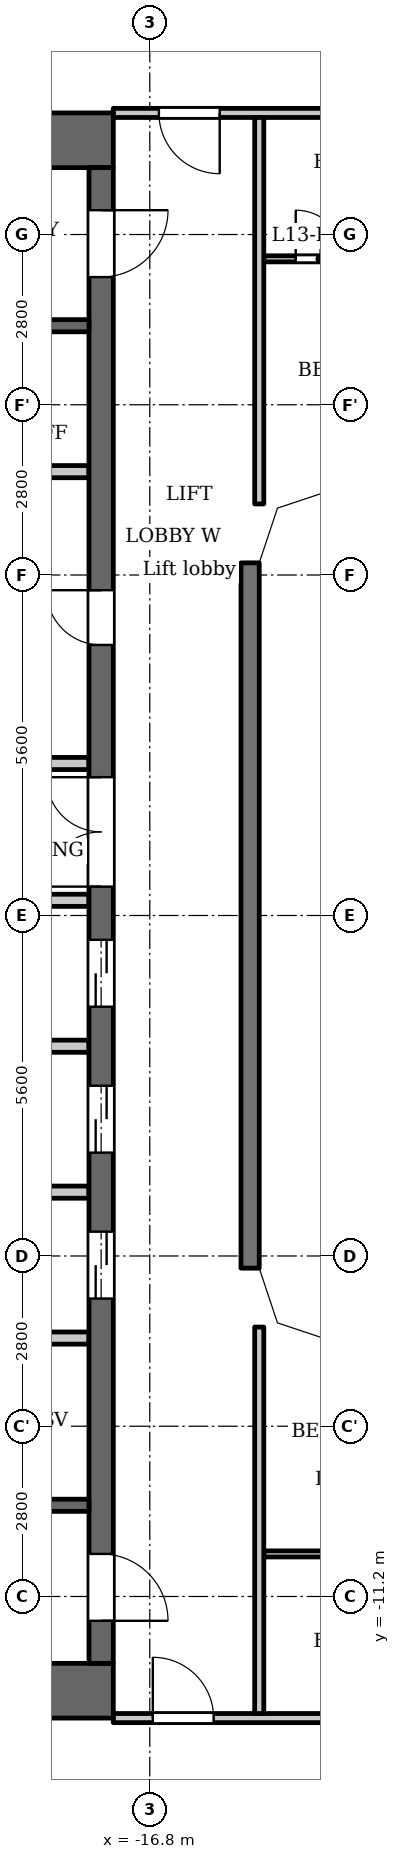
"""IFC4 building model, lengths in metres.
Left out: names, types, materials, properties, quantities, classifications, styles, units other than length and angle.
Written with IfcOpenShell. Run it as: python <this file> out.ifc"""

import sys

from ifc_helpers import new_model, si_unit, direction, frame, frame_2d, origin, place, context, subcontext, project, spatial, polyline, rectangle, outline, extrude, element, fill, save


model = new_model("IFC4")
c1 = context("Model", 3, precision=1e-05, world=origin(), true_north=direction((0.0, 1.0)))
c2 = subcontext(c1, "Body", "Model", "MODEL_VIEW")
j1 = project(units=[si_unit("LENGTHUNIT", "METRE"), si_unit("PLANEANGLEUNIT", "RADIAN")], contexts=[c1])
p1 = place(None, origin())
s1 = spatial("IfcSite", under=j1, at=p1, CompositionType="ELEMENT")
p2 = place(p1, origin())
s2 = spatial("IfcBuilding", under=s1, at=p2, CompositionType="ELEMENT")
p3 = place(p2, frame((0.0, 0.0, 55.0)))
s3 = spatial("IfcBuildingStorey", under=s2, at=p3, CompositionType="ELEMENT", Elevation=55.0)
p4 = place(p3, frame((-15.15, -5.8, 0.0), z_axis=(0.0, 0.0, 1.0), x_axis=(0.0, 1.0, 0.0)))
e1 = element("IfcWall", 1, at=p4, inside=s3, PredefinedType="SOLIDWALL", context=c2, shape_type="SweptSolid", body=[
    extrude(rectangle(XDim=11.6, YDim=0.3, at=frame_2d((5.8, 0.0))), origin(), (0.0, 0.0, 1.0), 3.2),
])
for number, where, z_axis, x_axis in (
    (2, (-17.4, 12.75, 0.0), (0.0, 0.0, 1.0), (-1.0, 0.0, 0.0)),
    (3, (-17.4, -12.75, 0.0), (0.0, 0.0, 1.0), (-1.0, 0.0, 0.0)),
):
    element("IfcWall", number, at=place(p3, frame(where, z_axis=z_axis, x_axis=x_axis)), inside=s3, PredefinedType="SHEAR", context=c2, shape_type="SweptSolid", body=[
        extrude(rectangle(XDim=10.4, YDim=0.9, at=frame_2d((5.2, 0.0))), origin(), (0.0, 0.0, 1.0), 3.2),
    ])
p5 = place(p3, frame((-17.6, -12.3, 0.0), z_axis=(0.0, 0.0, 1.0), x_axis=(0.0, 1.0, 0.0)))
e4 = element("IfcWall", 4, at=p5, inside=s3, PredefinedType="SHEAR", context=c2, shape_type="SweptSolid", body=[
    extrude(rectangle(XDim=24.6, YDim=0.4, at=frame_2d((12.3, 0.0))), origin(), (0.0, 0.0, 1.0), 3.2),
])
p6 = place(p5, frame((6.0, 0.0, 0.0)))
e5 = element("IfcOpeningElement", 5, at=p6, cuts=e4, PredefinedType="OPENING", context=c2, shape_type="SweptSolid", body=[
    extrude(rectangle(XDim=1.1, YDim=2.1, at=frame_2d((0.55, 1.05))), frame((0.0, 0.21, 0.0), z_axis=(0.0, -1.0, 0.0), x_axis=(1.0, 0.0, 0.0)), (0.0, 0.0, 1.0), 0.42),
])
p7 = place(p5, frame((8.4, 0.0, 0.0)))
e6 = element("IfcOpeningElement", 6, at=p7, cuts=e4, PredefinedType="OPENING", context=c2, shape_type="SweptSolid", body=[
    extrude(rectangle(XDim=1.1, YDim=2.1, at=frame_2d((0.55, 1.05))), frame((0.0, 0.21, 0.0), z_axis=(0.0, -1.0, 0.0), x_axis=(1.0, 0.0, 0.0)), (0.0, 0.0, 1.0), 0.42),
])
p8 = place(p5, frame((10.8, 0.0, 0.0)))
e7 = element("IfcOpeningElement", 7, at=p8, cuts=e4, PredefinedType="OPENING", context=c2, shape_type="SweptSolid", body=[
    extrude(rectangle(XDim=1.1, YDim=2.1, at=frame_2d((0.55, 1.05))), frame((0.0, 0.21, 0.0), z_axis=(0.0, -1.0, 0.0), x_axis=(1.0, 0.0, 0.0)), (0.0, 0.0, 1.0), 0.42),
])
p9 = place(p5, frame((16.75, 0.0, 0.0)))
e8 = element("IfcOpeningElement", 8, at=p9, cuts=e4, PredefinedType="OPENING", context=c2, shape_type="SweptSolid", body=[
    extrude(rectangle(XDim=0.9, YDim=2.1, at=frame_2d((0.45, 1.05))), frame((0.0, 0.21, 0.0), z_axis=(0.0, -1.0, 0.0), x_axis=(1.0, 0.0, 0.0)), (0.0, 0.0, 1.0), 0.42),
])
p10 = place(p5, frame((22.8, 0.0, 0.0)))
e9 = element("IfcOpeningElement", 9, at=p10, cuts=e4, PredefinedType="OPENING", context=c2, shape_type="SweptSolid", body=[
    extrude(rectangle(XDim=1.1, YDim=2.1, at=frame_2d((0.55, 1.05))), frame((0.0, 0.21, 0.0), z_axis=(0.0, -1.0, 0.0), x_axis=(1.0, 0.0, 0.0)), (0.0, 0.0, 1.0), 0.42),
])
p11 = place(p5, frame((0.7, 0.0, 0.0)))
e10 = element("IfcOpeningElement", 10, at=p11, cuts=e4, PredefinedType="OPENING", context=c2, shape_type="SweptSolid", body=[
    extrude(rectangle(XDim=1.1, YDim=2.1, at=frame_2d((0.55, 1.05))), frame((0.0, 0.21, 0.0), z_axis=(0.0, -1.0, 0.0), x_axis=(1.0, 0.0, 0.0)), (0.0, 0.0, 1.0), 0.42),
])
p12 = place(p5, frame((12.775, 0.0, 0.0)))
e11 = element("IfcOpeningElement", 11, at=p12, cuts=e4, PredefinedType="OPENING", context=c2, shape_type="SweptSolid", body=[
    extrude(rectangle(XDim=1.8, YDim=2.1, at=frame_2d((0.9, 1.05))), frame((0.0, 0.21, 0.0), z_axis=(0.0, -1.0, 0.0), x_axis=(1.0, 0.0, 0.0)), (0.0, 0.0, 1.0), 0.42),
])
p13 = place(p3, frame((-17.8, -9.7, 0.0), z_axis=(0.0, 0.0, 1.0), x_axis=(-1.0, 0.0, 0.0)))
e12 = element("IfcWall", 12, at=p13, inside=s3, PredefinedType="SHEAR", context=c2, shape_type="SweptSolid", body=[
    extrude(rectangle(XDim=8.3, YDim=0.2, at=frame_2d((4.15, 0.0))), origin(), (0.0, 0.0, 1.0), 3.2),
])
p14 = place(p13, frame((0.85, 0.0, 0.0)))
e13 = element("IfcOpeningElement", 13, at=p14, cuts=e12, PredefinedType="OPENING", context=c2, shape_type="SweptSolid", body=[
    extrude(rectangle(XDim=1.1, YDim=2.1, at=frame_2d((0.55, 1.05))), frame((0.0, 0.11, 0.0), z_axis=(0.0, -1.0, 0.0), x_axis=(1.0, 0.0, 0.0)), (0.0, 0.0, 1.0), 0.22),
])
p15 = place(p13, frame((3.75, 0.0, 0.0)))
e14 = element("IfcOpeningElement", 14, at=p15, cuts=e12, PredefinedType="OPENING", context=c2, shape_type="SweptSolid", body=[
    extrude(rectangle(XDim=1.1, YDim=2.1, at=frame_2d((0.55, 1.05))), frame((0.0, 0.11, 0.0), z_axis=(0.0, -1.0, 0.0), x_axis=(1.0, 0.0, 0.0)), (0.0, 0.0, 1.0), 0.22),
])
for number, where, z_axis, x_axis in (
    (15, (-17.8, -6.95, 0.0), (0.0, 0.0, 1.0), (-1.0, 0.0, 0.0)),
    (16, (-17.8, -4.55, 0.0), (0.0, 0.0, 1.0), (-1.0, 0.0, 0.0)),
    (17, (-17.8, -2.15, 0.0), (0.0, 0.0, 1.0), (-1.0, 0.0, 0.0)),
):
    element("IfcWall", number, at=place(p3, frame(where, z_axis=z_axis, x_axis=x_axis)), inside=s3, PredefinedType="PARTITIONING", context=c2, shape_type="SweptSolid", body=[
        extrude(rectangle(XDim=2.8, YDim=0.2, at=frame_2d((1.4, 0.0))), origin(), (0.0, 0.0, 1.0), 3.2),
    ])
for number, where, z_axis, x_axis in (
    (18, (-17.8, 0.25, 0.0), (0.0, 0.0, 1.0), (-1.0, 0.0, 0.0)),
    (19, (-17.8, 2.5, 0.0), (0.0, 0.0, 1.0), (-1.0, 0.0, 0.0)),
):
    element("IfcWall", number, at=place(p3, frame(where, z_axis=z_axis, x_axis=x_axis)), inside=s3, PredefinedType="PARTITIONING", context=c2, shape_type="SweptSolid", body=[
        extrude(rectangle(XDim=3.0, YDim=0.2, at=frame_2d((1.5, 0.0))), origin(), (0.0, 0.0, 1.0), 3.2),
    ])
p16 = place(p3, frame((-17.8, 7.3, 0.0), z_axis=(0.0, 0.0, 1.0), x_axis=(-1.0, 0.0, 0.0)))
e20 = element("IfcWall", 20, at=p16, inside=s3, PredefinedType="PARTITIONING", context=c2, shape_type="SweptSolid", body=[
    extrude(rectangle(XDim=2.8, YDim=0.2, at=frame_2d((1.4, 0.0))), origin(), (0.0, 0.0, 1.0), 3.2),
])
p17 = place(p3, frame((-17.8, 9.7, 0.0), z_axis=(0.0, 0.0, 1.0), x_axis=(-1.0, 0.0, 0.0)))
e21 = element("IfcWall", 21, at=p17, inside=s3, PredefinedType="SHEAR", context=c2, shape_type="SweptSolid", body=[
    extrude(rectangle(XDim=8.3, YDim=0.2, at=frame_2d((4.15, 0.0))), origin(), (0.0, 0.0, 1.0), 3.2),
])
p18 = place(p17, frame((0.85, 0.0, 0.0)))
e22 = element("IfcOpeningElement", 22, at=p18, cuts=e21, PredefinedType="OPENING", context=c2, shape_type="SweptSolid", body=[
    extrude(rectangle(XDim=1.1, YDim=2.1, at=frame_2d((0.55, 1.05))), frame((0.0, 0.11, 0.0), z_axis=(0.0, -1.0, 0.0), x_axis=(1.0, 0.0, 0.0)), (0.0, 0.0, 1.0), 0.22),
])
p19 = place(p17, frame((3.75, 0.0, 0.0)))
e23 = element("IfcOpeningElement", 23, at=p19, cuts=e21, PredefinedType="OPENING", context=c2, shape_type="SweptSolid", body=[
    extrude(rectangle(XDim=1.1, YDim=2.1, at=frame_2d((0.55, 1.05))), frame((0.0, 0.11, 0.0), z_axis=(0.0, -1.0, 0.0), x_axis=(1.0, 0.0, 0.0)), (0.0, 0.0, 1.0), 0.22),
])
p20 = place(p3, frame((-17.4, -13.2, 0.0), z_axis=(0.0, 0.0, 1.0), x_axis=(1.0, 0.0, 0.0)))
e24 = element("IfcWall", 24, at=p20, inside=s3, PredefinedType="PARTITIONING", context=c2, shape_type="SweptSolid", body=[
    extrude(rectangle(XDim=34.8, YDim=0.15, at=frame_2d((17.4, 0.0))), origin(), (0.0, 0.0, 1.0), 3.2),
])
p21 = place(p20, frame((0.65, 0.0, 0.0)))
e25 = element("IfcOpeningElement", 25, at=p21, cuts=e24, PredefinedType="OPENING", context=c2, shape_type="SweptSolid", body=[
    extrude(rectangle(XDim=1.0, YDim=2.1, at=frame_2d((0.5, 1.05))), frame((0.0, 0.085, 0.0), z_axis=(0.0, -1.0, 0.0), x_axis=(1.0, 0.0, 0.0)), (0.0, 0.0, 1.0), 0.17),
])
p22 = place(p20, frame((33.05, 0.0, 0.0)))
e26 = element("IfcOpeningElement", 26, at=p22, cuts=e24, PredefinedType="OPENING", context=c2, shape_type="SweptSolid", body=[
    extrude(rectangle(XDim=1.0, YDim=2.1, at=frame_2d((0.5, 1.05))), frame((0.0, 0.085, 0.0), z_axis=(0.0, -1.0, 0.0), x_axis=(1.0, 0.0, 0.0)), (0.0, 0.0, 1.0), 0.17),
])
p23 = place(p20, frame((10.15, 0.0, 0.0)))
e27 = element("IfcOpeningElement", 27, at=p23, cuts=e24, PredefinedType="OPENING", context=c2, shape_type="SweptSolid", body=[
    extrude(rectangle(XDim=1.0, YDim=2.1, at=frame_2d((0.5, 1.05))), frame((0.0, 0.085, 0.0), z_axis=(0.0, -1.0, 0.0), x_axis=(1.0, 0.0, 0.0)), (0.0, 0.0, 1.0), 0.17),
])
p24 = place(p20, frame((21.35, 0.0, 0.0)))
e28 = element("IfcOpeningElement", 28, at=p24, cuts=e24, PredefinedType="OPENING", context=c2, shape_type="SweptSolid", body=[
    extrude(rectangle(XDim=1.0, YDim=2.1, at=frame_2d((0.5, 1.05))), frame((0.0, 0.085, 0.0), z_axis=(0.0, -1.0, 0.0), x_axis=(1.0, 0.0, 0.0)), (0.0, 0.0, 1.0), 0.17),
])
p25 = place(p20, frame((30.75, 0.0, 0.0)))
e29 = element("IfcOpeningElement", 29, at=p25, cuts=e24, PredefinedType="OPENING", context=c2, shape_type="SweptSolid", body=[
    extrude(rectangle(XDim=1.0, YDim=2.1, at=frame_2d((0.5, 1.05))), frame((0.0, 0.085, 0.0), z_axis=(0.0, -1.0, 0.0), x_axis=(1.0, 0.0, 0.0)), (0.0, 0.0, 1.0), 0.17),
])
p26 = place(p3, frame((-14.925, -10.5, 0.0), z_axis=(0.0, 0.0, 1.0), x_axis=(1.0, 0.0, 0.0)))
e30 = element("IfcWall", 30, at=p26, inside=s3, PredefinedType="PARTITIONING", context=c2, shape_type="SweptSolid", body=[
    extrude(rectangle(XDim=29.85, YDim=0.1, at=frame_2d((14.925, 0.0))), origin(), (0.0, 0.0, 1.0), 3.2),
])
p27 = place(p26, frame((2.325, 0.0, 0.0)))
e31 = element("IfcOpeningElement", 31, at=p27, cuts=e30, PredefinedType="OPENING", context=c2, shape_type="SweptSolid", body=[
    extrude(rectangle(XDim=0.8, YDim=2.1, at=frame_2d((0.4, 1.05))), frame((0.0, 0.06, 0.0), z_axis=(0.0, -1.0, 0.0), x_axis=(1.0, 0.0, 0.0)), (0.0, 0.0, 1.0), 0.12),
])
p28 = place(p26, frame((7.775, 0.0, 0.0)))
e32 = element("IfcOpeningElement", 32, at=p28, cuts=e30, PredefinedType="OPENING", context=c2, shape_type="SweptSolid", body=[
    extrude(rectangle(XDim=0.9, YDim=2.1, at=frame_2d((0.45, 1.05))), frame((0.0, 0.06, 0.0), z_axis=(0.0, -1.0, 0.0), x_axis=(1.0, 0.0, 0.0)), (0.0, 0.0, 1.0), 0.12),
])
p29 = place(p26, frame((13.475, 0.0, 0.0)))
e33 = element("IfcOpeningElement", 33, at=p29, cuts=e30, PredefinedType="OPENING", context=c2, shape_type="SweptSolid", body=[
    extrude(rectangle(XDim=0.8, YDim=2.1, at=frame_2d((0.4, 1.05))), frame((0.0, 0.06, 0.0), z_axis=(0.0, -1.0, 0.0), x_axis=(1.0, 0.0, 0.0)), (0.0, 0.0, 1.0), 0.12),
])
p30 = place(p26, frame((18.975, 0.0, 0.0)))
e34 = element("IfcOpeningElement", 34, at=p30, cuts=e30, PredefinedType="OPENING", context=c2, shape_type="SweptSolid", body=[
    extrude(rectangle(XDim=0.9, YDim=2.1, at=frame_2d((0.45, 1.05))), frame((0.0, 0.06, 0.0), z_axis=(0.0, -1.0, 0.0), x_axis=(1.0, 0.0, 0.0)), (0.0, 0.0, 1.0), 0.12),
])
p31 = place(p26, frame((24.675, 0.0, 0.0)))
e35 = element("IfcOpeningElement", 35, at=p31, cuts=e30, PredefinedType="OPENING", context=c2, shape_type="SweptSolid", body=[
    extrude(rectangle(XDim=0.8, YDim=2.1, at=frame_2d((0.4, 1.05))), frame((0.0, 0.06, 0.0), z_axis=(0.0, -1.0, 0.0), x_axis=(1.0, 0.0, 0.0)), (0.0, 0.0, 1.0), 0.12),
])
p32 = place(p26, frame((28.375, 0.0, 0.0)))
e36 = element("IfcOpeningElement", 36, at=p32, cuts=e30, PredefinedType="OPENING", context=c2, shape_type="SweptSolid", body=[
    extrude(rectangle(XDim=0.9, YDim=2.1, at=frame_2d((0.45, 1.05))), frame((0.0, 0.06, 0.0), z_axis=(0.0, -1.0, 0.0), x_axis=(1.0, 0.0, 0.0)), (0.0, 0.0, 1.0), 0.12),
])
p33 = place(p3, frame((-14.925, 10.8, 0.0), z_axis=(0.0, 0.0, 1.0), x_axis=(1.0, 0.0, 0.0)))
e37 = element("IfcWall", 37, at=p33, inside=s3, PredefinedType="PARTITIONING", context=c2, shape_type="SweptSolid", body=[
    extrude(rectangle(XDim=29.85, YDim=0.1, at=frame_2d((14.925, 0.0))), origin(), (0.0, 0.0, 1.0), 3.2),
])
p34 = place(p33, frame((0.525, 0.0, 0.0)))
e38 = element("IfcOpeningElement", 38, at=p34, cuts=e37, PredefinedType="OPENING", context=c2, shape_type="SweptSolid", body=[
    extrude(rectangle(XDim=0.8, YDim=2.1, at=frame_2d((0.4, 1.05))), frame((0.0, 0.06, 0.0), z_axis=(0.0, -1.0, 0.0), x_axis=(1.0, 0.0, 0.0)), (0.0, 0.0, 1.0), 0.12),
])
p35 = place(p33, frame((5.375, 0.0, 0.0)))
e39 = element("IfcOpeningElement", 39, at=p35, cuts=e37, PredefinedType="OPENING", context=c2, shape_type="SweptSolid", body=[
    extrude(rectangle(XDim=0.9, YDim=2.1, at=frame_2d((0.45, 1.05))), frame((0.0, 0.06, 0.0), z_axis=(0.0, -1.0, 0.0), x_axis=(1.0, 0.0, 0.0)), (0.0, 0.0, 1.0), 0.12),
])
p36 = place(p33, frame((10.875, 0.0, 0.0)))
e40 = element("IfcOpeningElement", 40, at=p36, cuts=e37, PredefinedType="OPENING", context=c2, shape_type="SweptSolid", body=[
    extrude(rectangle(XDim=0.8, YDim=2.1, at=frame_2d((0.4, 1.05))), frame((0.0, 0.06, 0.0), z_axis=(0.0, -1.0, 0.0), x_axis=(1.0, 0.0, 0.0)), (0.0, 0.0, 1.0), 0.12),
])
p37 = place(p33, frame((12.975, 0.0, 0.0)))
e41 = element("IfcOpeningElement", 41, at=p37, cuts=e37, PredefinedType="OPENING", context=c2, shape_type="SweptSolid", body=[
    extrude(rectangle(XDim=0.9, YDim=2.1, at=frame_2d((0.45, 1.05))), frame((0.0, 0.06, 0.0), z_axis=(0.0, -1.0, 0.0), x_axis=(1.0, 0.0, 0.0)), (0.0, 0.0, 1.0), 0.12),
])
p38 = place(p33, frame((16.575, 0.0, 0.0)))
e42 = element("IfcOpeningElement", 42, at=p38, cuts=e37, PredefinedType="OPENING", context=c2, shape_type="SweptSolid", body=[
    extrude(rectangle(XDim=0.9, YDim=2.1, at=frame_2d((0.45, 1.05))), frame((0.0, 0.06, 0.0), z_axis=(0.0, -1.0, 0.0), x_axis=(1.0, 0.0, 0.0)), (0.0, 0.0, 1.0), 0.12),
])
p39 = place(p33, frame((18.825, 0.0, 0.0)))
e43 = element("IfcOpeningElement", 43, at=p39, cuts=e37, PredefinedType="OPENING", context=c2, shape_type="SweptSolid", body=[
    extrude(rectangle(XDim=0.9, YDim=2.1, at=frame_2d((0.45, 1.05))), frame((0.0, 0.06, 0.0), z_axis=(0.0, -1.0, 0.0), x_axis=(1.0, 0.0, 0.0)), (0.0, 0.0, 1.0), 0.12),
])
p40 = place(p33, frame((21.175, 0.0, 0.0)))
e44 = element("IfcOpeningElement", 44, at=p40, cuts=e37, PredefinedType="OPENING", context=c2, shape_type="SweptSolid", body=[
    extrude(rectangle(XDim=0.8, YDim=2.1, at=frame_2d((0.4, 1.05))), frame((0.0, 0.06, 0.0), z_axis=(0.0, -1.0, 0.0), x_axis=(1.0, 0.0, 0.0)), (0.0, 0.0, 1.0), 0.12),
])
p41 = place(p33, frame((27.775, 0.0, 0.0)))
e45 = element("IfcOpeningElement", 45, at=p41, cuts=e37, PredefinedType="OPENING", context=c2, shape_type="SweptSolid", body=[
    extrude(rectangle(XDim=0.9, YDim=2.1, at=frame_2d((0.45, 1.05))), frame((0.0, 0.06, 0.0), z_axis=(0.0, -1.0, 0.0), x_axis=(1.0, 0.0, 0.0)), (0.0, 0.0, 1.0), 0.12),
])
p42 = place(p3, frame((-17.4, 13.2, 0.0), z_axis=(0.0, 0.0, 1.0), x_axis=(1.0, 0.0, 0.0)))
e46 = element("IfcWall", 46, at=p42, inside=s3, PredefinedType="PARTITIONING", context=c2, shape_type="SweptSolid", body=[
    extrude(rectangle(XDim=34.8, YDim=0.15, at=frame_2d((17.4, 0.0))), origin(), (0.0, 0.0, 1.0), 3.2),
])
p43 = place(p42, frame((0.75, 0.0, 0.0)))
e47 = element("IfcOpeningElement", 47, at=p43, cuts=e46, PredefinedType="OPENING", context=c2, shape_type="SweptSolid", body=[
    extrude(rectangle(XDim=1.0, YDim=2.1, at=frame_2d((0.5, 1.05))), frame((0.0, 0.085, 0.0), z_axis=(0.0, -1.0, 0.0), x_axis=(1.0, 0.0, 0.0)), (0.0, 0.0, 1.0), 0.17),
])
p44 = place(p42, frame((33.15, 0.0, 0.0)))
e48 = element("IfcOpeningElement", 48, at=p44, cuts=e46, PredefinedType="OPENING", context=c2, shape_type="SweptSolid", body=[
    extrude(rectangle(XDim=1.0, YDim=2.1, at=frame_2d((0.5, 1.05))), frame((0.0, 0.085, 0.0), z_axis=(0.0, -1.0, 0.0), x_axis=(1.0, 0.0, 0.0)), (0.0, 0.0, 1.0), 0.17),
])
p45 = place(p42, frame((6.85, 0.0, 0.0)))
e49 = element("IfcOpeningElement", 49, at=p45, cuts=e46, PredefinedType="OPENING", context=c2, shape_type="SweptSolid", body=[
    extrude(rectangle(XDim=1.0, YDim=2.1, at=frame_2d((0.5, 1.05))), frame((0.0, 0.085, 0.0), z_axis=(0.0, -1.0, 0.0), x_axis=(1.0, 0.0, 0.0)), (0.0, 0.0, 1.0), 0.17),
])
p46 = place(p42, frame((18.05, 0.0, 0.0)))
e50 = element("IfcOpeningElement", 50, at=p46, cuts=e46, PredefinedType="OPENING", context=c2, shape_type="SweptSolid", body=[
    extrude(rectangle(XDim=1.0, YDim=2.1, at=frame_2d((0.5, 1.05))), frame((0.0, 0.085, 0.0), z_axis=(0.0, -1.0, 0.0), x_axis=(1.0, 0.0, 0.0)), (0.0, 0.0, 1.0), 0.17),
])
p47 = place(p42, frame((29.25, 0.0, 0.0)))
e51 = element("IfcOpeningElement", 51, at=p47, cuts=e46, PredefinedType="OPENING", context=c2, shape_type="SweptSolid", body=[
    extrude(rectangle(XDim=1.0, YDim=2.1, at=frame_2d((0.5, 1.05))), frame((0.0, 0.085, 0.0), z_axis=(0.0, -1.0, 0.0), x_axis=(1.0, 0.0, 0.0)), (0.0, 0.0, 1.0), 0.17),
])
for number, where, z_axis, x_axis in (
    (52, (-15.0, -13.125, 0.0), (0.0, 0.0, 1.0), (0.0, 1.0, 0.0)),
    (53, (-15.0, 6.769, 0.0), (0.0, 0.0, 1.0), (0.0, 1.0, 0.0)),
):
    element("IfcWall", number, at=place(p3, frame(where, z_axis=z_axis, x_axis=x_axis)), inside=s3, PredefinedType="PARTITIONING", context=c2, shape_type="SweptSolid", body=[
        extrude(rectangle(XDim=6.356, YDim=0.15, at=frame_2d((3.178, 0.0))), origin(), (0.0, 0.0, 1.0), 3.2),
    ])
p48 = place(p3, origin())
e54 = element("IfcWall", 54, at=p48, inside=s3, PredefinedType="SOLIDWALL", context=c2, shape_type="SweptSolid", body=[
    extrude(outline(polyline([(-13.849, 7.3), (-14.937, 6.937), (-15.3, 5.849), (-15.3, 5.8), (-15.0, 5.8), (-14.7, 6.7), (-13.8, 7.0), (-13.8, 7.3), (-13.849, 7.3)])), origin(), (0.0, 0.0, 1.0), 3.2),
])
e55 = element("IfcWall", 55, at=p48, inside=s3, PredefinedType="SOLIDWALL", context=c2, shape_type="SweptSolid", body=[
    extrude(outline(polyline([(-14.937, -6.937), (-13.849, -7.3), (-13.8, -7.3), (-13.8, -7.0), (-14.7, -6.7), (-15.0, -5.8), (-15.3, -5.8), (-15.3, -5.849), (-14.937, -6.937)])), origin(), (0.0, 0.0, 1.0), 3.2),
])
p49 = place(p6, origin())
e56 = element("IfcDoor", 56, at=p49, inside=s3, OperationType="DOUBLE_DOOR_SLIDING", PredefinedType="DOOR", context=c2, shape_type="SweptSolid", body=[
    extrude(rectangle(XDim=1.1, YDim=2.1, at=frame_2d((0.55, 1.05))), frame((0.0, 0.025, 0.0), z_axis=(0.0, -1.0, 0.0), x_axis=(1.0, 0.0, 0.0)), (0.0, 0.0, 1.0), 0.05),
])
fill(e5, e56)
p50 = place(p7, origin())
e57 = element("IfcDoor", 57, at=p50, inside=s3, OperationType="DOUBLE_DOOR_SLIDING", PredefinedType="DOOR", context=c2, shape_type="SweptSolid", body=[
    extrude(rectangle(XDim=1.1, YDim=2.1, at=frame_2d((0.55, 1.05))), frame((0.0, 0.025, 0.0), z_axis=(0.0, -1.0, 0.0), x_axis=(1.0, 0.0, 0.0)), (0.0, 0.0, 1.0), 0.05),
])
fill(e6, e57)
p51 = place(p8, origin())
e58 = element("IfcDoor", 58, at=p51, inside=s3, OperationType="DOUBLE_DOOR_SLIDING", PredefinedType="DOOR", context=c2, shape_type="SweptSolid", body=[
    extrude(rectangle(XDim=1.1, YDim=2.1, at=frame_2d((0.55, 1.05))), frame((0.0, 0.025, 0.0), z_axis=(0.0, -1.0, 0.0), x_axis=(1.0, 0.0, 0.0)), (0.0, 0.0, 1.0), 0.05),
])
fill(e7, e58)
p52 = place(p9, origin())
e59 = element("IfcDoor", 59, at=p52, inside=s3, OperationType="SINGLE_SWING_LEFT", PredefinedType="DOOR", context=c2, shape_type="SweptSolid", body=[
    extrude(rectangle(XDim=0.9, YDim=2.1, at=frame_2d((0.45, 1.05))), frame((0.0, 0.025, 0.0), z_axis=(0.0, -1.0, 0.0), x_axis=(1.0, 0.0, 0.0)), (0.0, 0.0, 1.0), 0.05),
])
fill(e8, e59)
p53 = place(p10, origin())
e60 = element("IfcDoor", 60, at=p53, inside=s3, OperationType="SINGLE_SWING_RIGHT", PredefinedType="DOOR", context=c2, shape_type="SweptSolid", body=[
    extrude(rectangle(XDim=1.1, YDim=2.1, at=frame_2d((0.55, 1.05))), frame((0.0, 0.025, 0.0), z_axis=(0.0, -1.0, 0.0), x_axis=(1.0, 0.0, 0.0)), (0.0, 0.0, 1.0), 0.05),
])
fill(e9, e60)
p54 = place(p11, origin())
e61 = element("IfcDoor", 61, at=p54, inside=s3, OperationType="SINGLE_SWING_LEFT", PredefinedType="DOOR", context=c2, shape_type="SweptSolid", body=[
    extrude(rectangle(XDim=1.1, YDim=2.1, at=frame_2d((0.55, 1.05))), frame((0.0, 0.025, 0.0), z_axis=(0.0, -1.0, 0.0), x_axis=(1.0, 0.0, 0.0)), (0.0, 0.0, 1.0), 0.05),
])
fill(e10, e61)
p55 = place(p12, origin())
e62 = element("IfcDoor", 62, at=p55, inside=s3, OperationType="DOUBLE_DOOR_SINGLE_SWING", PredefinedType="DOOR", context=c2, shape_type="SweptSolid", body=[
    extrude(rectangle(XDim=1.8, YDim=2.1, at=frame_2d((0.9, 1.05))), frame((0.0, 0.025, 0.0), z_axis=(0.0, -1.0, 0.0), x_axis=(1.0, 0.0, 0.0)), (0.0, 0.0, 1.0), 0.05),
])
fill(e11, e62)
p56 = place(p43, origin())
e63 = element("IfcDoor", 63, at=p56, inside=s3, OperationType="SINGLE_SWING_RIGHT", PredefinedType="DOOR", context=c2, shape_type="SweptSolid", body=[
    extrude(rectangle(XDim=1.0, YDim=2.1, at=frame_2d((0.5, 1.05))), frame((0.0, 0.025, 0.0), z_axis=(0.0, -1.0, 0.0), x_axis=(1.0, 0.0, 0.0)), (0.0, 0.0, 1.0), 0.05),
])
fill(e47, e63)
p57 = place(p21, origin())
e64 = element("IfcDoor", 64, at=p57, inside=s3, OperationType="SINGLE_SWING_RIGHT", PredefinedType="DOOR", context=c2, shape_type="SweptSolid", body=[
    extrude(rectangle(XDim=1.0, YDim=2.1, at=frame_2d((0.5, 1.05))), frame((0.0, 0.025, 0.0), z_axis=(0.0, -1.0, 0.0), x_axis=(1.0, 0.0, 0.0)), (0.0, 0.0, 1.0), 0.05),
])
fill(e25, e64)
p58 = place(p34, origin())
e65 = element("IfcDoor", 65, at=p58, inside=s3, OperationType="SINGLE_SWING_RIGHT", PredefinedType="DOOR", context=c2, shape_type="SweptSolid", body=[
    extrude(rectangle(XDim=0.8, YDim=2.1, at=frame_2d((0.4, 1.05))), frame((0.0, 0.025, 0.0), z_axis=(0.0, -1.0, 0.0), x_axis=(1.0, 0.0, 0.0)), (0.0, 0.0, 1.0), 0.05),
])
fill(e38, e65)
save(model, sys.argv[1])
